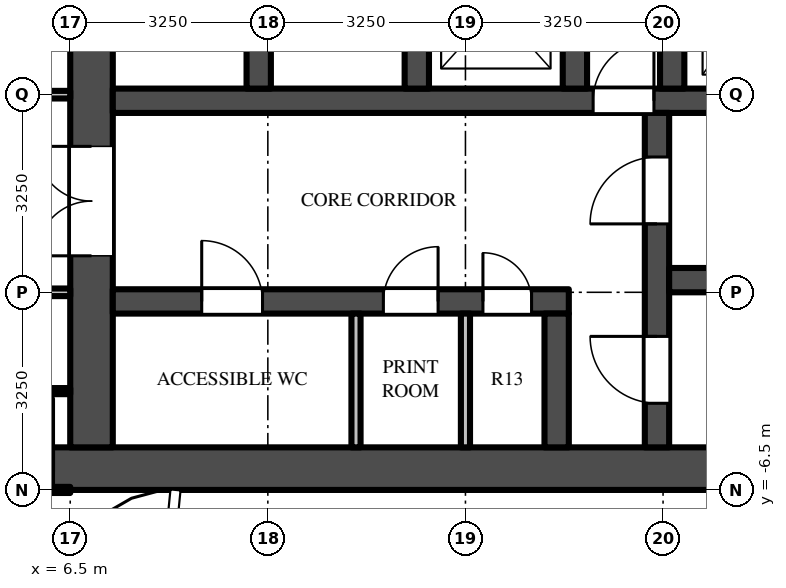
"""IFC4 building model, lengths in metres.
Left out: names, types, materials, properties, quantities, classifications, styles, units other than length and angle.
Written with IfcOpenShell. Run it as: python <this file> out.ifc"""

import sys

from ifc_helpers import new_model, si_unit, direction, frame, frame_2d, origin, origin_2d, place, context, subcontext, project, spatial, rectangle, extrude, source, transform, mapped, element, fill, save


model = new_model("IFC4")
c1 = context("Model", 3, precision=1e-05, world=origin(), true_north=direction((0.0, 1.0)))
c2 = subcontext(c1, "Body", "Model", "MODEL_VIEW")
j1 = project(units=[si_unit("LENGTHUNIT", "METRE"), si_unit("PLANEANGLEUNIT", "RADIAN")], contexts=[c1])
p1 = place(None, origin())
s1 = spatial("IfcSite", under=j1, at=p1, CompositionType="ELEMENT")
p2 = place(p1, origin())
s2 = spatial("IfcBuilding", under=s1, at=p2, CompositionType="ELEMENT")
p3 = place(p2, frame((0.0, 0.0, 177.6)))
s3 = spatial("IfcBuildingStorey", under=s2, at=p3, CompositionType="ELEMENT", Elevation=177.6)
m1 = source(origin(), c2, "Body", "SweptSolid", [
    extrude(rectangle(XDim=1.2, YDim=1.2, at=origin_2d()), origin(), (0.0, 0.0, 1.0), 3.9),
])
p4 = place(p3, frame((5.6, -5.6, 0.0), z_axis=(0.0, 0.0, 1.0), x_axis=(1.0, 0.0, 0.0)))
e1 = element("IfcColumn", 1, at=p4, inside=s3, PredefinedType="COLUMN", context=c2, shape_type="MappedRepresentation", body=[
    mapped(m1, transform((0.0, 0.0, 0.0))),
])
m2 = source(origin(), c2, "Body", "SweptSolid", [
    extrude(rectangle(XDim=16.55, YDim=0.7, at=frame_2d((8.275, 0.0))), origin(), (0.0, 0.0, 1.0), 3.7),
])
p5 = place(p3, frame((6.2, -6.15, 0.0), z_axis=(0.0, 0.0, 1.0), x_axis=(1.0, 0.0, 0.0)))
e2 = element("IfcWall", 2, at=p5, inside=s3, PredefinedType="SHEAR", context=c2, shape_type="MappedRepresentation", body=[
    mapped(m2, transform((0.0, 0.0, 0.0))),
])
m3 = source(origin(), c2, "Body", "SweptSolid", [
    extrude(rectangle(XDim=9.05, YDim=0.7, at=frame_2d((4.525, 0.0))), origin(), (0.0, 0.0, 1.0), 3.7),
])
p6 = place(p3, frame((6.85, -5.8, 0.0), z_axis=(0.0, 0.0, 1.0), x_axis=(0.0, 1.0, 0.0)))
e3 = element("IfcWall", 3, at=p6, inside=s3, PredefinedType="SHEAR", context=c2, shape_type="MappedRepresentation", body=[
    mapped(m3, transform((0.0, 0.0, 0.0))),
])
m4 = source(origin(), c2, "Body", "SweptSolid", [
    extrude(rectangle(XDim=1.8, YDim=2.1, at=frame_2d((0.9, 1.05))), frame((0.0, 0.36, 0.0), z_axis=(0.0, -1.0, 0.0), x_axis=(1.0, 0.0, 0.0)), (0.0, 0.0, 1.0), 0.72),
])
p7 = place(p6, frame((3.15, 0.0, 0.0)))
e4 = element("IfcOpeningElement", 4, at=p7, cuts=e3, PredefinedType="OPENING", context=c2, shape_type="MappedRepresentation", body=[
    mapped(m4, transform((0.0, 0.0, 0.0))),
])
m5 = source(origin(), c2, "Body", "SweptSolid", [
    extrude(rectangle(XDim=7.5, YDim=0.4, at=frame_2d((3.75, 0.0))), origin(), (0.0, 0.0, 1.0), 3.7),
])
p8 = place(p3, frame((7.2, -3.4, 0.0), z_axis=(0.0, 0.0, 1.0), x_axis=(1.0, 0.0, 0.0)))
e5 = element("IfcWall", 5, at=p8, inside=s3, PredefinedType="SHEAR", context=c2, shape_type="MappedRepresentation", body=[
    mapped(m5, transform((0.0, 0.0, 0.0))),
])
m6 = source(origin(), c2, "Body", "SweptSolid", [
    extrude(rectangle(XDim=1.0, YDim=2.1, at=frame_2d((0.5, 1.05))), frame((0.0, 0.21, 0.0), z_axis=(0.0, -1.0, 0.0), x_axis=(1.0, 0.0, 0.0)), (0.0, 0.0, 1.0), 0.42),
])
p9 = place(p8, frame((1.462, 0.0, 0.0)))
e6 = element("IfcOpeningElement", 6, at=p9, cuts=e5, PredefinedType="OPENING", context=c2, shape_type="MappedRepresentation", body=[
    mapped(m6, transform((0.0, 0.0, 0.0))),
])
m7 = source(origin(), c2, "Body", "SweptSolid", [
    extrude(rectangle(XDim=0.9, YDim=2.1, at=frame_2d((0.45, 1.05))), frame((0.0, 0.21, 0.0), z_axis=(0.0, -1.0, 0.0), x_axis=(1.0, 0.0, 0.0)), (0.0, 0.0, 1.0), 0.42),
])
p10 = place(p8, frame((4.45, 0.0, 0.0)))
e7 = element("IfcOpeningElement", 7, at=p10, cuts=e5, PredefinedType="OPENING", context=c2, shape_type="MappedRepresentation", body=[
    mapped(m7, transform((0.0, 0.0, 0.0))),
])
m8 = source(origin(), c2, "Body", "SweptSolid", [
    extrude(rectangle(XDim=0.8, YDim=2.1, at=frame_2d((0.4, 1.05))), frame((0.0, 0.21, 0.0), z_axis=(0.0, -1.0, 0.0), x_axis=(1.0, 0.0, 0.0)), (0.0, 0.0, 1.0), 0.42),
])
p11 = place(p8, frame((6.087, 0.0, 0.0)))
e8 = element("IfcOpeningElement", 8, at=p11, cuts=e5, PredefinedType="OPENING", context=c2, shape_type="MappedRepresentation", body=[
    mapped(m8, transform((0.0, 0.0, 0.0))),
])
m9 = source(origin(), c2, "Body", "SweptSolid", [
    extrude(rectangle(XDim=14.85, YDim=0.4, at=frame_2d((7.425, 0.0))), origin(), (0.0, 0.0, 1.0), 3.7),
])
p12 = place(p3, frame((7.2, -0.1, 0.0), z_axis=(0.0, 0.0, 1.0), x_axis=(1.0, 0.0, 0.0)))
e9 = element("IfcWall", 9, at=p12, inside=s3, PredefinedType="SHEAR", context=c2, shape_type="MappedRepresentation", body=[
    mapped(m9, transform((0.0, 0.0, 0.0))),
])
p13 = place(p12, frame((7.9, 0.0, 0.0)))
e10 = element("IfcOpeningElement", 10, at=p13, cuts=e9, PredefinedType="OPENING", context=c2, shape_type="MappedRepresentation", body=[
    mapped(m6, transform((0.0, 0.0, 0.0))),
])
m10 = source(origin(), c2, "Body", "SweptSolid", [
    extrude(rectangle(XDim=5.5, YDim=0.4, at=frame_2d((2.75, 0.0))), origin(), (0.0, 0.0, 1.0), 3.7),
])
p14 = place(p3, frame((16.15, -5.8, 0.0), z_axis=(0.0, 0.0, 1.0), x_axis=(0.0, 1.0, 0.0)))
e11 = element("IfcWall", 11, at=p14, inside=s3, PredefinedType="SHEAR", context=c2, shape_type="MappedRepresentation", body=[
    mapped(m10, transform((0.0, 0.0, 0.0))),
])
m11 = source(origin(), c2, "Body", "SweptSolid", [
    extrude(rectangle(XDim=1.1, YDim=2.1, at=frame_2d((0.55, 1.05))), frame((0.0, 0.21, 0.0), z_axis=(0.0, -1.0, 0.0), x_axis=(1.0, 0.0, 0.0)), (0.0, 0.0, 1.0), 0.42),
])
p15 = place(p14, frame((0.725, 0.0, 0.0)))
e12 = element("IfcOpeningElement", 12, at=p15, cuts=e11, PredefinedType="OPENING", context=c2, shape_type="MappedRepresentation", body=[
    mapped(m11, transform((0.0, 0.0, 0.0))),
])
p16 = place(p14, frame((3.675, 0.0, 0.0)))
e13 = element("IfcOpeningElement", 13, at=p16, cuts=e11, PredefinedType="OPENING", context=c2, shape_type="MappedRepresentation", body=[
    mapped(m11, transform((0.0, 0.0, 0.0))),
])
m12 = source(origin(), c2, "Body", "SweptSolid", [
    extrude(rectangle(XDim=5.7, YDim=0.4, at=frame_2d((2.85, 0.0))), origin(), (0.0, 0.0, 1.0), 3.7),
])
p17 = place(p3, frame((16.35, -3.05, 0.0), z_axis=(0.0, 0.0, 1.0), x_axis=(1.0, 0.0, 0.0)))
e14 = element("IfcWall", 14, at=p17, inside=s3, PredefinedType="SHEAR", context=c2, shape_type="MappedRepresentation", body=[
    mapped(m12, transform((0.0, 0.0, 0.0))),
])
m13 = source(origin(), c2, "Body", "SweptSolid", [
    extrude(rectangle(XDim=2.2, YDim=0.4, at=frame_2d((1.1, 0.0))), origin(), (0.0, 0.0, 1.0), 3.7),
])
p18 = place(p3, frame((14.5, -5.8, 0.0), z_axis=(0.0, 0.0, 1.0), x_axis=(0.0, 1.0, 0.0)))
e15 = element("IfcWall", 15, at=p18, inside=s3, PredefinedType="SHEAR", context=c2, shape_type="MappedRepresentation", body=[
    mapped(m13, transform((0.0, 0.0, 0.0))),
])
m14 = source(origin(), c2, "Body", "SweptSolid", [
    extrude(rectangle(XDim=2.45, YDim=0.4, at=frame_2d((1.225, 0.0))), origin(), (0.0, 0.0, 1.0), 3.7),
])
for number, where, z_axis, x_axis in (
    (16, (9.6, 0.1, 0.0), (0.0, 0.0, 1.0), (0.0, 1.0, 0.0)),
    (17, (12.2, 0.1, 0.0), (0.0, 0.0, 1.0), (0.0, 1.0, 0.0)),
    (18, (14.8, 0.1, 0.0), (0.0, 0.0, 1.0), (0.0, 1.0, 0.0)),
    (19, (16.4, 0.1, 0.0), (0.0, 0.0, 1.0), (0.0, 1.0, 0.0)),
):
    element("IfcWall", number, at=place(p3, frame(where, z_axis=z_axis, x_axis=x_axis)), inside=s3, PredefinedType="SHEAR", context=c2, shape_type="MappedRepresentation", body=[
        mapped(m14, transform((0.0, 0.0, 0.0))),
    ])
m15 = source(origin(), c2, "Body", "SweptSolid", [
    extrude(rectangle(XDim=2.2, YDim=0.15, at=frame_2d((1.1, 0.0))), origin(), (0.0, 0.0, 1.0), 3.7),
])
for number, where, z_axis, x_axis in (
    (20, (11.2, -5.8, 0.0), (0.0, 0.0, 1.0), (0.0, 1.0, 0.0)),
    (21, (13.0, -5.8, 0.0), (0.0, 0.0, 1.0), (0.0, 1.0, 0.0)),
):
    element("IfcWall", number, at=place(p3, frame(where, z_axis=z_axis, x_axis=x_axis)), inside=s3, PredefinedType="PARTITIONING", context=c2, shape_type="MappedRepresentation", body=[
        mapped(m15, transform((0.0, 0.0, 0.0))),
    ])
m16 = source(origin(), c2, "Body", "SweptSolid", [
    extrude(rectangle(XDim=5.238, YDim=0.1, at=frame_2d((2.619, 0.0))), origin(), (0.0, 0.0, 1.0), 2.78),
])
p19 = place(p3, frame((1.262, -6.5, 0.0), z_axis=(0.0, 0.0, 1.0), x_axis=(1.0, 0.0, 0.0)))
e22 = element("IfcWall", 22, at=p19, inside=s3, PredefinedType="PARTITIONING", context=c2, shape_type="MappedRepresentation", body=[
    mapped(m16, transform((0.0, 0.0, 0.0))),
])
m17 = source(origin(), c2, "Body", "SweptSolid", [
    extrude(rectangle(XDim=5.238, YDim=0.1, at=frame_2d((2.619, 0.0))), origin(), (0.0, 0.0, 1.0), 2.997),
])
p20 = place(p3, frame((1.262, -4.875, 0.0), z_axis=(0.0, 0.0, 1.0), x_axis=(1.0, 0.0, 0.0)))
e23 = element("IfcWall", 23, at=p20, inside=s3, PredefinedType="PARTITIONING", context=c2, shape_type="MappedRepresentation", body=[
    mapped(m17, transform((0.0, 0.0, 0.0))),
])
m18 = source(origin(), c2, "Body", "SweptSolid", [
    extrude(rectangle(XDim=5.363, YDim=0.125, at=frame_2d((2.681, 0.0))), origin(), (0.0, 0.0, 1.0), 2.997),
])
p21 = place(p3, frame((6.5, -3.25, 0.0), z_axis=(0.0, 0.0, 1.0), x_axis=(-1.0, 0.0, 0.0)))
e24 = element("IfcWall", 24, at=p21, inside=s3, PredefinedType="PARTITIONING", context=c2, shape_type="MappedRepresentation", body=[
    mapped(m18, transform((0.0, 0.0, 0.0))),
])
m19 = source(origin(), c2, "Body", "SweptSolid", [
    extrude(rectangle(XDim=1.0, YDim=2.1, at=frame_2d((0.5, 1.05))), frame((0.0, 0.073, 0.0), z_axis=(0.0, -1.0, 0.0), x_axis=(1.0, 0.0, 0.0)), (0.0, 0.0, 1.0), 0.145),
])
p22 = place(p21, frame((0.35, 0.0, 0.0)))
e25 = element("IfcOpeningElement", 25, at=p22, cuts=e24, PredefinedType="OPENING", context=c2, shape_type="MappedRepresentation", body=[
    mapped(m19, transform((0.0, 0.0, 0.0))),
])
p23 = place(p3, frame((6.5, 0.0, 0.0), z_axis=(0.0, 0.0, 1.0), x_axis=(-1.0, 0.0, 0.0)))
e26 = element("IfcWall", 26, at=p23, inside=s3, PredefinedType="PARTITIONING", context=c2, shape_type="MappedRepresentation", body=[
    mapped(m18, transform((0.0, 0.0, 0.0))),
])
p24 = place(p23, frame((3.95, 0.0, 0.0)))
e27 = element("IfcOpeningElement", 27, at=p24, cuts=e26, PredefinedType="OPENING", context=c2, shape_type="MappedRepresentation", body=[
    mapped(m19, transform((0.0, 0.0, 0.0))),
])
m20 = source(origin(), c2, "Body", "SweptSolid", [
    extrude(rectangle(XDim=1.8, YDim=2.1, at=frame_2d((0.9, 1.05))), frame((0.0, -0.275, 0.0), z_axis=(0.0, -1.0, 0.0), x_axis=(1.0, 0.0, 0.0)), (0.0, 0.0, 1.0), 0.05),
])
p25 = place(p7, origin())
e28 = element("IfcDoor", 28, at=p25, inside=s3, OperationType="DOUBLE_DOOR_SINGLE_SWING", PredefinedType="DOOR", context=c2, shape_type="MappedRepresentation", body=[
    mapped(m20, transform((0.0, 0.0, 0.0))),
])
fill(e4, e28)
m21 = source(origin(), c2, "Body", "SweptSolid", [
    extrude(rectangle(XDim=1.1, YDim=2.1, at=frame_2d((0.55, 1.05))), frame((0.0, 0.025, 0.0), z_axis=(0.0, -1.0, 0.0), x_axis=(1.0, 0.0, 0.0)), (0.0, 0.0, 1.0), 0.05),
])
p26 = place(p15, origin())
e29 = element("IfcDoor", 29, at=p26, inside=s3, OperationType="SINGLE_SWING_RIGHT", PredefinedType="DOOR", context=c2, shape_type="MappedRepresentation", body=[
    mapped(m21, transform((0.0, 0.0, 0.0))),
])
fill(e12, e29)
p27 = place(p16, origin())
e30 = element("IfcDoor", 30, at=p27, inside=s3, OperationType="SINGLE_SWING_LEFT", PredefinedType="DOOR", context=c2, shape_type="MappedRepresentation", body=[
    mapped(m21, transform((0.0, 0.0, 0.0))),
])
fill(e13, e30)
m22 = source(origin(), c2, "Body", "SweptSolid", [
    extrude(rectangle(XDim=1.0, YDim=2.1, at=frame_2d((0.5, 1.05))), frame((0.0, 0.025, 0.0), z_axis=(0.0, -1.0, 0.0), x_axis=(1.0, 0.0, 0.0)), (0.0, 0.0, 1.0), 0.05),
])
p28 = place(p13, origin())
e31 = element("IfcDoor", 31, at=p28, inside=s3, OperationType="SINGLE_SWING_RIGHT", PredefinedType="DOOR", context=c2, shape_type="MappedRepresentation", body=[
    mapped(m22, transform((0.0, 0.0, 0.0))),
])
fill(e10, e31)
p29 = place(p9, origin())
e32 = element("IfcDoor", 32, at=p29, inside=s3, OperationType="SINGLE_SWING_LEFT", PredefinedType="DOOR", context=c2, shape_type="MappedRepresentation", body=[
    mapped(m22, transform((0.0, 0.0, 0.0))),
])
fill(e6, e32)
m23 = source(origin(), c2, "Body", "SweptSolid", [
    extrude(rectangle(XDim=0.9, YDim=2.1, at=frame_2d((0.45, 1.05))), frame((0.0, 0.025, 0.0), z_axis=(0.0, -1.0, 0.0), x_axis=(1.0, 0.0, 0.0)), (0.0, 0.0, 1.0), 0.05),
])
p30 = place(p10, origin())
e33 = element("IfcDoor", 33, at=p30, inside=s3, OperationType="SINGLE_SWING_RIGHT", PredefinedType="DOOR", context=c2, shape_type="MappedRepresentation", body=[
    mapped(m23, transform((0.0, 0.0, 0.0))),
])
fill(e7, e33)
m24 = source(origin(), c2, "Body", "SweptSolid", [
    extrude(rectangle(XDim=0.8, YDim=2.1, at=frame_2d((0.4, 1.05))), frame((0.0, 0.025, 0.0), z_axis=(0.0, -1.0, 0.0), x_axis=(1.0, 0.0, 0.0)), (0.0, 0.0, 1.0), 0.05),
])
p31 = place(p11, origin())
e34 = element("IfcDoor", 34, at=p31, inside=s3, OperationType="SINGLE_SWING_LEFT", PredefinedType="DOOR", context=c2, shape_type="MappedRepresentation", body=[
    mapped(m24, transform((0.0, 0.0, 0.0))),
])
fill(e8, e34)
save(model, sys.argv[1])
